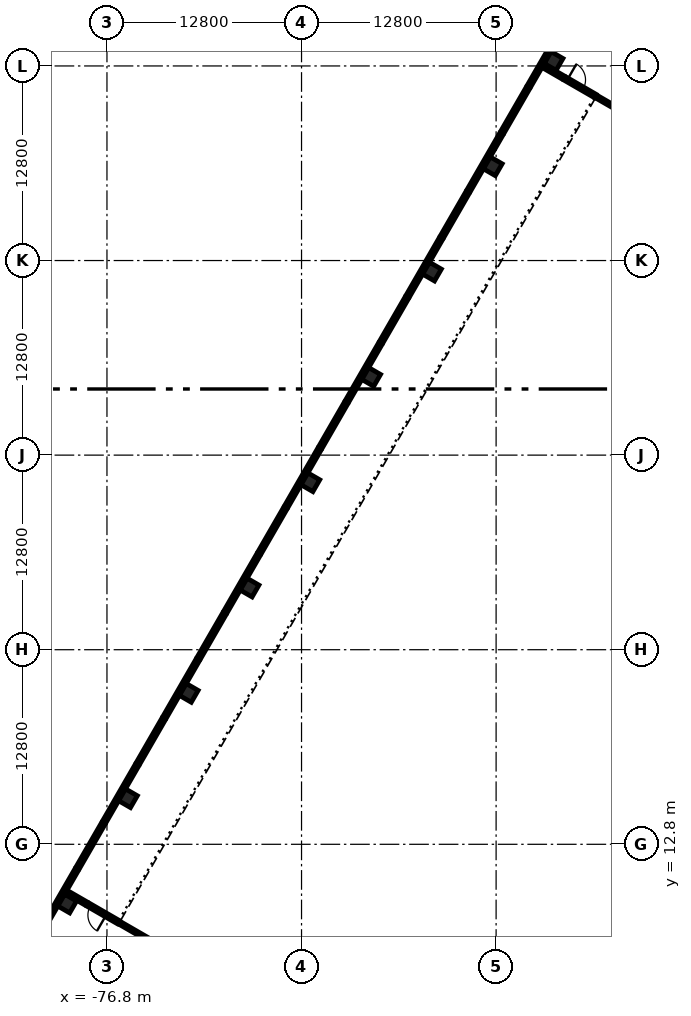
"""IFC4 building model, lengths in metres.
Left out: names, types, materials, properties, quantities, classifications, styles, units other than length and angle.
Written with IfcOpenShell. Run it as: python <this file> out.ifc"""

import sys

from ifc_helpers import new_model, si_unit, direction, frame, frame_2d, origin, origin_2d, place, context, subcontext, project, spatial, rectangle, extrude, element, fill, save


model = new_model("IFC4")
c1 = context("Model", 3, precision=1e-05, world=origin(), true_north=direction((0.0, 1.0)))
c2 = subcontext(c1, "Body", "Model", "MODEL_VIEW")
j1 = project(units=[si_unit("LENGTHUNIT", "METRE"), si_unit("PLANEANGLEUNIT", "RADIAN")], contexts=[c1])
p1 = place(None, origin())
s1 = spatial("IfcSite", under=j1, at=p1, CompositionType="ELEMENT")
p2 = place(p1, origin())
s2 = spatial("IfcBuilding", under=s1, at=p2, CompositionType="ELEMENT")
p3 = place(p2, frame((0.0, 0.0, 6.0)))
s3 = spatial("IfcBuildingStorey", under=s2, at=p3, CompositionType="ELEMENT", Elevation=6.0)
for number, where, z_axis, x_axis in (
    (1, (-47.417, 64.327, 0.0), (0.0, 0.0, 1.0), (-0.5, -0.866, 0.0)),
    (2, (-51.417, 57.399, 0.0), (0.0, 0.0, 1.0), (-0.5, -0.866, 0.0)),
    (3, (-55.417, 50.47, 0.0), (0.0, 0.0, 1.0), (-0.5, -0.866, 0.0)),
    (4, (-59.417, 43.542, 0.0), (0.0, 0.0, 1.0), (-0.5, -0.866, 0.0)),
    (5, (-63.417, 36.614, 0.0), (0.0, 0.0, 1.0), (-0.5, -0.866, 0.0)),
    (6, (-67.417, 29.686, 0.0), (0.0, 0.0, 1.0), (-0.5, -0.866, 0.0)),
    (7, (-71.417, 22.758, 0.0), (0.0, 0.0, 1.0), (-0.5, -0.866, 0.0)),
    (8, (-75.417, 15.829, 0.0), (0.0, 0.0, 1.0), (-0.5, -0.866, 0.0)),
    (9, (-79.417, 8.901, 0.0), (0.0, 0.0, 1.0), (-0.5, -0.866, 0.0)),
):
    element("IfcColumn", number, at=place(p3, frame(where, z_axis=z_axis, x_axis=x_axis)), inside=s3, PredefinedType="COLUMN", context=c2, shape_type="SweptSolid", body=[
        extrude(rectangle(XDim=0.9, YDim=0.9, at=origin_2d()), origin(), (0.0, 0.0, 1.0), 5.4),
    ])
p4 = place(p3, frame((-49.071, 62.612, 0.0), z_axis=(0.0, 0.0, 1.0), x_axis=(0.500001855621, 0.866024332438, 0.0)))
e10 = element("IfcWall", 10, at=p4, inside=s3, PredefinedType="SOLIDWALL", context=c2, shape_type="SweptSolid", body=[
    extrude(rectangle(XDim=10.312, YDim=0.25, at=frame_2d((5.156, 0.0))), origin(), (0.0, 0.0, 1.0), 5.1),
])
p5 = place(p3, frame((-50.821, 59.581, 0.0), z_axis=(0.0, 0.0, 1.0), x_axis=(0.500010275428, 0.866019471182, 0.0)))
e11 = element("IfcWall", 11, at=p5, inside=s3, PredefinedType="SOLIDWALL", context=c2, shape_type="SweptSolid", body=[
    extrude(rectangle(XDim=3.5, YDim=0.25, at=frame_2d((1.75, 0.0))), origin(), (0.0, 0.0, 1.0), 5.1),
])
p6 = place(p5, frame((0.25, 0.0, 0.9)))
e12 = element("IfcOpeningElement", 12, at=p6, cuts=e11, PredefinedType="OPENING", context=c2, shape_type="SweptSolid", body=[
    extrude(rectangle(XDim=3.0, YDim=2.2, at=frame_2d((1.5, 1.1))), frame((0.0, 0.135, 0.0), z_axis=(0.0, -1.0, 0.0), x_axis=(1.0, 0.0, 0.0)), (0.0, 0.0, 1.0), 0.27),
])
p7 = place(p3, frame((-53.04, 55.738, 0.0), z_axis=(0.0, 0.0, 1.0), x_axis=(0.499990705068, 0.866030770149, 0.0)))
e13 = element("IfcWall", 13, at=p7, inside=s3, PredefinedType="SOLIDWALL", context=c2, shape_type="SweptSolid", body=[
    extrude(rectangle(XDim=4.438, YDim=0.25, at=frame_2d((2.219, 0.0))), origin(), (0.0, 0.0, 1.0), 5.1),
])
p8 = place(p3, frame((-54.79, 52.706, 0.0), z_axis=(0.0, 0.0, 1.0), x_axis=(0.499980071345, 0.866036909293, 0.0)))
e14 = element("IfcWall", 14, at=p8, inside=s3, PredefinedType="SOLIDWALL", context=c2, shape_type="SweptSolid", body=[
    extrude(rectangle(XDim=3.5, YDim=0.25, at=frame_2d((1.75, 0.0))), origin(), (0.0, 0.0, 1.0), 5.1),
])
p9 = place(p8, frame((0.25, 0.0, 0.9)))
e15 = element("IfcOpeningElement", 15, at=p9, cuts=e14, PredefinedType="OPENING", context=c2, shape_type="SweptSolid", body=[
    extrude(rectangle(XDim=3.0, YDim=2.2, at=frame_2d((1.5, 1.1))), frame((0.0, 0.135, 0.0), z_axis=(0.0, -1.0, 0.0), x_axis=(1.0, 0.0, 0.0)), (0.0, 0.0, 1.0), 0.27),
])
p10 = place(p3, frame((-57.04, 48.809, 0.0), z_axis=(0.0, 0.0, 1.0), x_axis=(0.500013631625, 0.866017533419, 0.0)))
e16 = element("IfcWall", 16, at=p10, inside=s3, PredefinedType="SOLIDWALL", context=c2, shape_type="SweptSolid", body=[
    extrude(rectangle(XDim=4.5, YDim=0.25, at=frame_2d((2.25, 0.0))), origin(), (0.0, 0.0, 1.0), 5.1),
])
p11 = place(p3, frame((-58.79, 45.778, 0.0), z_axis=(0.0, 0.0, 1.0), x_axis=(0.500010275428, 0.866019471182, 0.0)))
e17 = element("IfcWall", 17, at=p11, inside=s3, PredefinedType="SOLIDWALL", context=c2, shape_type="SweptSolid", body=[
    extrude(rectangle(XDim=3.5, YDim=0.25, at=frame_2d((1.75, 0.0))), origin(), (0.0, 0.0, 1.0), 5.1),
])
p12 = place(p11, frame((0.25, 0.0, 0.9)))
e18 = element("IfcOpeningElement", 18, at=p12, cuts=e17, PredefinedType="OPENING", context=c2, shape_type="SweptSolid", body=[
    extrude(rectangle(XDim=3.0, YDim=2.2, at=frame_2d((1.5, 1.1))), frame((0.0, 0.135, 0.0), z_axis=(0.0, -1.0, 0.0), x_axis=(1.0, 0.0, 0.0)), (0.0, 0.0, 1.0), 0.27),
])
p13 = place(p3, frame((-61.04, 41.881, 0.0), z_axis=(0.0, 0.0, 1.0), x_axis=(0.499990139034, 0.866031096941, 0.0)))
e19 = element("IfcWall", 19, at=p13, inside=s3, PredefinedType="SOLIDWALL", context=c2, shape_type="SweptSolid", body=[
    extrude(rectangle(XDim=4.5, YDim=0.25, at=frame_2d((2.25, 0.0))), origin(), (0.0, 0.0, 1.0), 5.1),
])
p14 = place(p3, frame((-62.79, 38.85, 0.0), z_axis=(0.0, 0.0, 1.0), x_axis=(0.500010275428, 0.866019471182, 0.0)))
e20 = element("IfcWall", 20, at=p14, inside=s3, PredefinedType="SOLIDWALL", context=c2, shape_type="SweptSolid", body=[
    extrude(rectangle(XDim=3.5, YDim=0.25, at=frame_2d((1.75, 0.0))), origin(), (0.0, 0.0, 1.0), 5.1),
])
p15 = place(p14, frame((0.25, 0.0, 0.9)))
e21 = element("IfcOpeningElement", 21, at=p15, cuts=e20, PredefinedType="OPENING", context=c2, shape_type="SweptSolid", body=[
    extrude(rectangle(XDim=3.0, YDim=2.2, at=frame_2d((1.5, 1.1))), frame((0.0, 0.135, 0.0), z_axis=(0.0, -1.0, 0.0), x_axis=(1.0, 0.0, 0.0)), (0.0, 0.0, 1.0), 0.27),
])
p16 = place(p3, frame((-65.04, 34.953, 0.0), z_axis=(0.0, 0.0, 1.0), x_axis=(0.499990139034, 0.866031096941, 0.0)))
e22 = element("IfcWall", 22, at=p16, inside=s3, PredefinedType="SOLIDWALL", context=c2, shape_type="SweptSolid", body=[
    extrude(rectangle(XDim=4.5, YDim=0.25, at=frame_2d((2.25, 0.0))), origin(), (0.0, 0.0, 1.0), 5.1),
])
p17 = place(p3, frame((-66.79, 31.922, 0.0), z_axis=(0.0, 0.0, 1.0), x_axis=(0.500010275428, 0.866019471182, 0.0)))
e23 = element("IfcWall", 23, at=p17, inside=s3, PredefinedType="SOLIDWALL", context=c2, shape_type="SweptSolid", body=[
    extrude(rectangle(XDim=3.5, YDim=0.25, at=frame_2d((1.75, 0.0))), origin(), (0.0, 0.0, 1.0), 5.1),
])
p18 = place(p17, frame((0.25, 0.0, 0.9)))
e24 = element("IfcOpeningElement", 24, at=p18, cuts=e23, PredefinedType="OPENING", context=c2, shape_type="SweptSolid", body=[
    extrude(rectangle(XDim=3.0, YDim=2.2, at=frame_2d((1.5, 1.1))), frame((0.0, 0.135, 0.0), z_axis=(0.0, -1.0, 0.0), x_axis=(1.0, 0.0, 0.0)), (0.0, 0.0, 1.0), 0.27),
])
p19 = place(p3, frame((-69.04, 28.025, 0.0), z_axis=(0.0, 0.0, 1.0), x_axis=(0.499990139034, 0.866031096941, 0.0)))
e25 = element("IfcWall", 25, at=p19, inside=s3, PredefinedType="SOLIDWALL", context=c2, shape_type="SweptSolid", body=[
    extrude(rectangle(XDim=4.5, YDim=0.25, at=frame_2d((2.25, 0.0))), origin(), (0.0, 0.0, 1.0), 5.1),
])
p20 = place(p3, frame((-70.79, 24.994, 0.0), z_axis=(0.0, 0.0, 1.0), x_axis=(0.500010275428, 0.866019471182, 0.0)))
e26 = element("IfcWall", 26, at=p20, inside=s3, PredefinedType="SOLIDWALL", context=c2, shape_type="SweptSolid", body=[
    extrude(rectangle(XDim=3.5, YDim=0.25, at=frame_2d((1.75, 0.0))), origin(), (0.0, 0.0, 1.0), 5.1),
])
p21 = place(p20, frame((0.25, 0.0, 0.9)))
e27 = element("IfcOpeningElement", 27, at=p21, cuts=e26, PredefinedType="OPENING", context=c2, shape_type="SweptSolid", body=[
    extrude(rectangle(XDim=3.0, YDim=2.2, at=frame_2d((1.5, 1.1))), frame((0.0, 0.135, 0.0), z_axis=(0.0, -1.0, 0.0), x_axis=(1.0, 0.0, 0.0)), (0.0, 0.0, 1.0), 0.27),
])
p22 = place(p3, frame((-73.04, 21.096, 0.0), z_axis=(0.0, 0.0, 1.0), x_axis=(0.499990139034, 0.866031096941, 0.0)))
e28 = element("IfcWall", 28, at=p22, inside=s3, PredefinedType="SOLIDWALL", context=c2, shape_type="SweptSolid", body=[
    extrude(rectangle(XDim=4.5, YDim=0.25, at=frame_2d((2.25, 0.0))), origin(), (0.0, 0.0, 1.0), 5.1),
])
p23 = place(p3, frame((-74.79, 18.065, 0.0), z_axis=(0.0, 0.0, 1.0), x_axis=(0.500010275428, 0.866019471182, 0.0)))
e29 = element("IfcWall", 29, at=p23, inside=s3, PredefinedType="SOLIDWALL", context=c2, shape_type="SweptSolid", body=[
    extrude(rectangle(XDim=3.5, YDim=0.25, at=frame_2d((1.75, 0.0))), origin(), (0.0, 0.0, 1.0), 5.1),
])
p24 = place(p23, frame((0.25, 0.0, 0.9)))
e30 = element("IfcOpeningElement", 30, at=p24, cuts=e29, PredefinedType="OPENING", context=c2, shape_type="SweptSolid", body=[
    extrude(rectangle(XDim=3.0, YDim=2.2, at=frame_2d((1.5, 1.1))), frame((0.0, 0.135, 0.0), z_axis=(0.0, -1.0, 0.0), x_axis=(1.0, 0.0, 0.0)), (0.0, 0.0, 1.0), 0.27),
])
p25 = place(p3, frame((-77.009, 14.222, 0.0), z_axis=(0.0, 0.0, 1.0), x_axis=(0.499990705068, 0.866030770149, 0.0)))
e31 = element("IfcWall", 31, at=p25, inside=s3, PredefinedType="SOLIDWALL", context=c2, shape_type="SweptSolid", body=[
    extrude(rectangle(XDim=4.438, YDim=0.25, at=frame_2d((2.219, 0.0))), origin(), (0.0, 0.0, 1.0), 5.1),
])
p26 = place(p3, frame((-78.759, 11.191, 0.0), z_axis=(0.0, 0.0, 1.0), x_axis=(0.500010275428, 0.866019471182, 0.0)))
e32 = element("IfcWall", 32, at=p26, inside=s3, PredefinedType="SOLIDWALL", context=c2, shape_type="SweptSolid", body=[
    extrude(rectangle(XDim=3.5, YDim=0.25, at=frame_2d((1.75, 0.0))), origin(), (0.0, 0.0, 1.0), 5.1),
])
p27 = place(p26, frame((0.25, 0.0, 0.9)))
e33 = element("IfcOpeningElement", 33, at=p27, cuts=e32, PredefinedType="OPENING", context=c2, shape_type="SweptSolid", body=[
    extrude(rectangle(XDim=3.0, YDim=2.2, at=frame_2d((1.5, 1.1))), frame((0.0, 0.135, 0.0), z_axis=(0.0, -1.0, 0.0), x_axis=(1.0, 0.0, 0.0)), (0.0, 0.0, 1.0), 0.27),
])
p28 = place(p3, frame((-83.915, 2.26, 0.0), z_axis=(0.0, 0.0, 1.0), x_axis=(0.500001855621, 0.866024332438, 0.0)))
e34 = element("IfcWall", 34, at=p28, inside=s3, PredefinedType="SOLIDWALL", context=c2, shape_type="SweptSolid", body=[
    extrude(rectangle(XDim=10.312, YDim=0.25, at=frame_2d((5.156, 0.0))), origin(), (0.0, 0.0, 1.0), 5.1),
])
p29 = place(p3, frame((-46.734, 63.21, 0.0), z_axis=(0.0, 0.0, 1.0), x_axis=(0.866057815567, -0.499943856944, 0.0)))
e35 = element("IfcWall", 35, at=p29, inside=s3, PredefinedType="SOLIDWALL", context=c2, shape_type="SweptSolid", body=[
    extrude(rectangle(XDim=2.45, YDim=0.25, at=frame_2d((1.225, 0.0))), origin(), (0.0, 0.0, 1.0), 4.5),
])
p30 = place(p29, frame((0.25, 0.0, 0.0)))
e36 = element("IfcOpeningElement", 36, at=p30, cuts=e35, PredefinedType="OPENING", context=c2, shape_type="SweptSolid", body=[
    extrude(rectangle(XDim=1.2, YDim=2.1, at=frame_2d((0.6, 1.05))), frame((0.0, 0.135, 0.0), z_axis=(0.0, -1.0, 0.0), x_axis=(1.0, 0.0, 0.0)), (0.0, 0.0, 1.0), 0.27),
])
p31 = place(p3, frame((-46.734, 63.21, 0.0), z_axis=(0.0, 0.0, 1.0), x_axis=(-0.865989903783, 0.500061482766, 0.0)))
e37 = element("IfcWall", 37, at=p31, inside=s3, PredefinedType="SOLIDWALL", context=c2, shape_type="SweptSolid", body=[
    extrude(rectangle(XDim=1.6, YDim=0.25, at=frame_2d((0.8, 0.0))), origin(), (0.0, 0.0, 1.0), 4.5),
])
p32 = place(p3, frame((-75.987, 7.642, 0.0), z_axis=(0.0, 0.0, 1.0), x_axis=(-0.866014668023, 0.500018594424, 0.0)))
e38 = element("IfcWall", 38, at=p32, inside=s3, PredefinedType="SOLIDWALL", context=c2, shape_type="SweptSolid", body=[
    extrude(rectangle(XDim=2.45, YDim=0.25, at=frame_2d((1.225, 0.0))), origin(), (0.0, 0.0, 1.0), 4.5),
])
p33 = place(p32, frame((1.0, 0.0, 0.0)))
e39 = element("IfcOpeningElement", 39, at=p33, cuts=e38, PredefinedType="OPENING", context=c2, shape_type="SweptSolid", body=[
    extrude(rectangle(XDim=1.2, YDim=2.1, at=frame_2d((0.6, 1.05))), frame((0.0, 0.135, 0.0), z_axis=(0.0, -1.0, 0.0), x_axis=(1.0, 0.0, 0.0)), (0.0, 0.0, 1.0), 0.27),
])
p34 = place(p3, frame((-78.109, 8.867, 0.0), z_axis=(0.0, 0.0, 1.0), x_axis=(-0.865989903783, 0.500061482766, 0.0)))
e40 = element("IfcWall", 40, at=p34, inside=s3, PredefinedType="SOLIDWALL", context=c2, shape_type="SweptSolid", body=[
    extrude(rectangle(XDim=1.6, YDim=0.25, at=frame_2d((0.8, 0.0))), origin(), (0.0, 0.0, 1.0), 4.5),
])
p35 = place(p3, frame((-10.491, 42.285, 0.0), z_axis=(0.0, 0.0, 1.0), x_axis=(-0.866022857395, 0.50000441045, 0.0)))
e41 = element("IfcWall", 41, at=p35, inside=s3, PredefinedType="PARTITIONING", context=c2, shape_type="SweptSolid", body=[
    extrude(rectangle(XDim=39.4, YDim=0.2, at=frame_2d((19.7, 0.0))), origin(), (0.0, 0.0, 1.0), 4.5),
])
p36 = place(p3, frame((-41.866, -12.058, 0.0), z_axis=(0.0, 0.0, 1.0), x_axis=(-0.866025540551, 0.499999763114, 0.0)))
e42 = element("IfcWall", 42, at=p36, inside=s3, PredefinedType="PARTITIONING", context=c2, shape_type="SweptSolid", body=[
    extrude(rectangle(XDim=39.4, YDim=0.2, at=frame_2d((19.7, 0.0))), origin(), (0.0, 0.0, 1.0), 4.5),
])
p37 = place(p6, origin())
e43 = element("IfcWindow", 43, at=p37, inside=s3, PartitioningType="SINGLE_PANEL", PredefinedType="WINDOW", context=c2, shape_type="SweptSolid", body=[
    extrude(rectangle(XDim=3.0, YDim=2.2, at=frame_2d((1.5, 1.1))), frame((0.0, 0.03, 0.0), z_axis=(0.0, -1.0, 0.0), x_axis=(1.0, 0.0, 0.0)), (0.0, 0.0, 1.0), 0.06),
])
fill(e12, e43)
p38 = place(p9, origin())
e44 = element("IfcWindow", 44, at=p38, inside=s3, PartitioningType="SINGLE_PANEL", PredefinedType="WINDOW", context=c2, shape_type="SweptSolid", body=[
    extrude(rectangle(XDim=3.0, YDim=2.2, at=frame_2d((1.5, 1.1))), frame((0.0, 0.03, 0.0), z_axis=(0.0, -1.0, 0.0), x_axis=(1.0, 0.0, 0.0)), (0.0, 0.0, 1.0), 0.06),
])
fill(e15, e44)
p39 = place(p12, origin())
e45 = element("IfcWindow", 45, at=p39, inside=s3, PartitioningType="SINGLE_PANEL", PredefinedType="WINDOW", context=c2, shape_type="SweptSolid", body=[
    extrude(rectangle(XDim=3.0, YDim=2.2, at=frame_2d((1.5, 1.1))), frame((0.0, 0.03, 0.0), z_axis=(0.0, -1.0, 0.0), x_axis=(1.0, 0.0, 0.0)), (0.0, 0.0, 1.0), 0.06),
])
fill(e18, e45)
p40 = place(p15, origin())
e46 = element("IfcWindow", 46, at=p40, inside=s3, PartitioningType="SINGLE_PANEL", PredefinedType="WINDOW", context=c2, shape_type="SweptSolid", body=[
    extrude(rectangle(XDim=3.0, YDim=2.2, at=frame_2d((1.5, 1.1))), frame((0.0, 0.03, 0.0), z_axis=(0.0, -1.0, 0.0), x_axis=(1.0, 0.0, 0.0)), (0.0, 0.0, 1.0), 0.06),
])
fill(e21, e46)
p41 = place(p18, origin())
e47 = element("IfcWindow", 47, at=p41, inside=s3, PartitioningType="SINGLE_PANEL", PredefinedType="WINDOW", context=c2, shape_type="SweptSolid", body=[
    extrude(rectangle(XDim=3.0, YDim=2.2, at=frame_2d((1.5, 1.1))), frame((0.0, 0.03, 0.0), z_axis=(0.0, -1.0, 0.0), x_axis=(1.0, 0.0, 0.0)), (0.0, 0.0, 1.0), 0.06),
])
fill(e24, e47)
p42 = place(p21, origin())
e48 = element("IfcWindow", 48, at=p42, inside=s3, PartitioningType="SINGLE_PANEL", PredefinedType="WINDOW", context=c2, shape_type="SweptSolid", body=[
    extrude(rectangle(XDim=3.0, YDim=2.2, at=frame_2d((1.5, 1.1))), frame((0.0, 0.03, 0.0), z_axis=(0.0, -1.0, 0.0), x_axis=(1.0, 0.0, 0.0)), (0.0, 0.0, 1.0), 0.06),
])
fill(e27, e48)
p43 = place(p24, origin())
e49 = element("IfcWindow", 49, at=p43, inside=s3, PartitioningType="SINGLE_PANEL", PredefinedType="WINDOW", context=c2, shape_type="SweptSolid", body=[
    extrude(rectangle(XDim=3.0, YDim=2.2, at=frame_2d((1.5, 1.1))), frame((0.0, 0.03, 0.0), z_axis=(0.0, -1.0, 0.0), x_axis=(1.0, 0.0, 0.0)), (0.0, 0.0, 1.0), 0.06),
])
fill(e30, e49)
p44 = place(p27, origin())
e50 = element("IfcWindow", 50, at=p44, inside=s3, PartitioningType="SINGLE_PANEL", PredefinedType="WINDOW", context=c2, shape_type="SweptSolid", body=[
    extrude(rectangle(XDim=3.0, YDim=2.2, at=frame_2d((1.5, 1.1))), frame((0.0, 0.03, 0.0), z_axis=(0.0, -1.0, 0.0), x_axis=(1.0, 0.0, 0.0)), (0.0, 0.0, 1.0), 0.06),
])
fill(e33, e50)
p45 = place(p30, origin())
e51 = element("IfcDoor", 51, at=p45, inside=s3, OperationType="SINGLE_SWING_LEFT", PredefinedType="DOOR", context=c2, shape_type="SweptSolid", body=[
    extrude(rectangle(XDim=1.2, YDim=2.1, at=frame_2d((0.6, 1.05))), frame((0.0, 0.025, 0.0), z_axis=(0.0, -1.0, 0.0), x_axis=(1.0, 0.0, 0.0)), (0.0, 0.0, 1.0), 0.05),
])
fill(e36, e51)
p46 = place(p33, origin())
e52 = element("IfcDoor", 52, at=p46, inside=s3, OperationType="SINGLE_SWING_LEFT", PredefinedType="DOOR", context=c2, shape_type="SweptSolid", body=[
    extrude(rectangle(XDim=1.2, YDim=2.1, at=frame_2d((0.6, 1.05))), frame((0.0, 0.025, 0.0), z_axis=(0.0, -1.0, 0.0), x_axis=(1.0, 0.0, 0.0)), (0.0, 0.0, 1.0), 0.05),
])
fill(e39, e52)
save(model, sys.argv[1])
